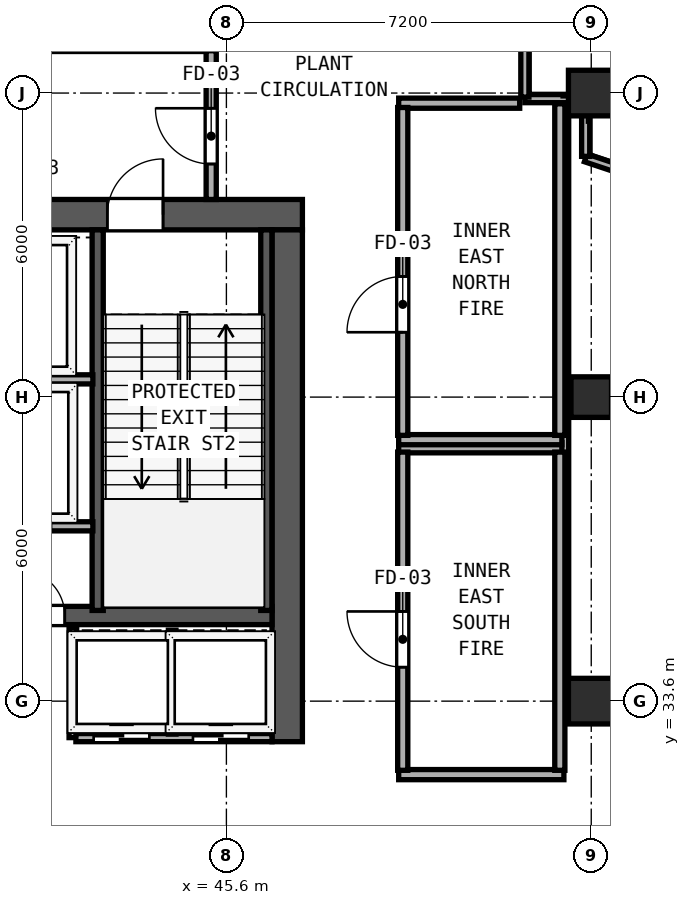
"""IFC4 building model, lengths in metres.
Left out: names, types, materials, properties, quantities, classifications, styles, units other than length and angle.
Written with IfcOpenShell. Run it as: python <this file> out.ifc"""

import sys

from ifc_helpers import new_model, si_unit, direction, frame, frame_2d, origin, origin_2d, place, context, subcontext, project, spatial, rectangle, hollow_rectangle, extrude, element, fill, save


model = new_model("IFC4")
c1 = context("Model", 3, precision=1e-05, world=origin(), true_north=direction((0.0, 1.0)))
c2 = subcontext(c1, "Body", "Model", "MODEL_VIEW")
j1 = project(units=[si_unit("LENGTHUNIT", "METRE"), si_unit("PLANEANGLEUNIT", "RADIAN")], contexts=[c1])
p1 = place(None, origin())
s1 = spatial("IfcSite", under=j1, at=p1, CompositionType="ELEMENT")
p2 = place(p1, origin())
s2 = spatial("IfcBuilding", under=s1, at=p2, CompositionType="ELEMENT")
p3 = place(p2, frame((0.0, 0.0, 230.6)))
s3 = spatial("IfcBuildingStorey", under=s2, at=p3, CompositionType="ELEMENT", Elevation=230.6)
p4 = place(p3, frame((29.7, 43.2, 0.0), z_axis=(0.0, 0.0, 1.0), x_axis=(1.0, 0.0, 0.0)))
e1 = element("IfcWall", 1, at=p4, inside=s3, PredefinedType="SHEAR", context=c2, shape_type="SweptSolid", body=[
    extrude(rectangle(XDim=17.4, YDim=0.6, at=frame_2d((8.7, 0.0))), origin(), (0.0, 0.0, 1.0), 4.35),
])
p5 = place(p4, frame((2.35, 0.0, 0.0)))
e2 = element("IfcOpeningElement", 2, at=p5, cuts=e1, PredefinedType="OPENING", context=c2, shape_type="SweptSolid", body=[
    extrude(rectangle(XDim=1.1, YDim=2.15, at=frame_2d((0.55, 1.075))), frame((0.0, 0.31, 0.0), z_axis=(0.0, -1.0, 0.0), x_axis=(1.0, 0.0, 0.0)), (0.0, 0.0, 1.0), 0.62),
])
p6 = place(p4, frame((7.46, 0.0, 0.0)))
e3 = element("IfcOpeningElement", 3, at=p6, cuts=e1, PredefinedType="OPENING", context=c2, shape_type="SweptSolid", body=[
    extrude(rectangle(XDim=1.1, YDim=2.15, at=frame_2d((0.55, 1.075))), frame((0.0, 0.31, 0.0), z_axis=(0.0, -1.0, 0.0), x_axis=(1.0, 0.0, 0.0)), (0.0, 0.0, 1.0), 0.62),
])
p7 = place(p4, frame((13.55, 0.0, 0.0)))
e4 = element("IfcOpeningElement", 4, at=p7, cuts=e1, PredefinedType="OPENING", context=c2, shape_type="SweptSolid", body=[
    extrude(rectangle(XDim=1.1, YDim=2.15, at=frame_2d((0.55, 1.075))), frame((0.0, 0.31, 0.0), z_axis=(0.0, -1.0, 0.0), x_axis=(1.0, 0.0, 0.0)), (0.0, 0.0, 1.0), 0.62),
])
p8 = place(p4, frame((4.68, 0.0, 0.0)))
e5 = element("IfcOpeningElement", 5, at=p8, cuts=e1, PredefinedType="OPENING", context=c2, shape_type="SweptSolid", body=[
    extrude(rectangle(XDim=1.1, YDim=2.2, at=frame_2d((0.55, 1.1))), frame((0.0, 0.31, 0.0), z_axis=(0.0, -1.0, 0.0), x_axis=(1.0, 0.0, 0.0)), (0.0, 0.0, 1.0), 0.62),
])
p9 = place(p4, frame((11.04, 0.0, 0.0)))
e6 = element("IfcOpeningElement", 6, at=p9, cuts=e1, PredefinedType="OPENING", context=c2, shape_type="SweptSolid", body=[
    extrude(rectangle(XDim=1.1, YDim=2.2, at=frame_2d((0.55, 1.1))), frame((0.0, 0.31, 0.0), z_axis=(0.0, -1.0, 0.0), x_axis=(1.0, 0.0, 0.0)), (0.0, 0.0, 1.0), 0.62),
])
p10 = place(p3, frame((46.8, 32.8, 0.0), z_axis=(0.0, 0.0, 1.0), x_axis=(0.0, 1.0, 0.0)))
e7 = element("IfcWall", 7, at=p10, inside=s3, PredefinedType="SHEAR", context=c2, shape_type="SweptSolid", body=[
    extrude(rectangle(XDim=10.1, YDim=0.6, at=frame_2d((5.05, 0.0))), origin(), (0.0, 0.0, 1.0), 4.35),
])
p11 = place(p3, frame((30.3, 35.29, 0.0), z_axis=(0.0, 0.0, 1.0), x_axis=(1.0, 0.0, 0.0)))
e8 = element("IfcWall", 8, at=p11, inside=s3, PredefinedType="SHEAR", context=c2, shape_type="SweptSolid", body=[
    extrude(rectangle(XDim=16.2, YDim=0.36, at=frame_2d((8.1, 0.0))), origin(), (0.0, 0.0, 1.0), 4.35),
])
p12 = place(p11, frame((5.05, 0.0, 0.0), z_axis=(0.0, 0.0, 1.0), x_axis=(-1.0, 0.0, 0.0)))
e9 = element("IfcOpeningElement", 9, at=p12, cuts=e8, PredefinedType="OPENING", context=c2, shape_type="SweptSolid", body=[
    extrude(rectangle(XDim=0.9, YDim=2.1, at=frame_2d((0.45, 1.05))), frame((0.0, 0.19, 0.0), z_axis=(0.0, -1.0, 0.0), x_axis=(1.0, 0.0, 0.0)), (0.0, 0.0, 1.0), 0.38),
])
p13 = place(p11, frame((12.11, 0.0, 0.0), z_axis=(0.0, 0.0, 1.0), x_axis=(-1.0, 0.0, 0.0)))
e10 = element("IfcOpeningElement", 10, at=p13, cuts=e8, PredefinedType="OPENING", context=c2, shape_type="SweptSolid", body=[
    extrude(rectangle(XDim=0.9, YDim=2.1, at=frame_2d((0.45, 1.05))), frame((0.0, 0.19, 0.0), z_axis=(0.0, -1.0, 0.0), x_axis=(1.0, 0.0, 0.0)), (0.0, 0.0, 1.0), 0.38),
])
for number, where, z_axis, x_axis in (
    (11, (43.06, 35.39, 0.0), (0.0, 0.0, 1.0), (0.0, 1.0, 0.0)),
    (12, (46.388, 35.39, 0.0), (0.0, 0.0, 1.0), (0.0, 1.0, 0.0)),
):
    element("IfcWall", number, at=place(p3, frame(where, z_axis=z_axis, x_axis=x_axis)), inside=s3, PredefinedType="SHEAR", context=c2, shape_type="SweptSolid", body=[
        extrude(rectangle(XDim=7.51, YDim=0.22, at=frame_2d((3.755, 0.0))), origin(), (0.0, 0.0, 1.0), 4.35),
    ])
for number, where, z_axis, x_axis in (
    (13, (52.8, 33.6, 0.0), (0.0, 0.0, 1.0), (1.0, 0.0, 0.0)),
    (14, (52.8, 45.6, 0.0), (0.0, 0.0, 1.0), (1.0, 0.0, 0.0)),
):
    element("IfcColumn", number, at=place(p3, frame(where, z_axis=z_axis, x_axis=x_axis)), inside=s3, PredefinedType="COLUMN", context=c2, shape_type="SweptSolid", body=[
        extrude(hollow_rectangle(XDim=0.9, YDim=0.9, WallThickness=0.034, at=origin_2d()), origin(), (0.0, 0.0, 1.0), 4.6),
    ])
p14 = place(p3, frame((52.8, 39.6, 0.0), z_axis=(0.0, 0.0, 1.0), x_axis=(1.0, 0.0, 0.0)))
e15 = element("IfcColumn", 15, at=p14, inside=s3, PredefinedType="COLUMN", context=c2, shape_type="SweptSolid", body=[
    extrude(hollow_rectangle(XDim=0.8, YDim=0.8, WallThickness=0.03, at=origin_2d()), origin(), (0.0, 0.0, 1.0), 4.6),
])
p15 = place(p3, frame((58.476, 42.392, 0.0), z_axis=(0.0, 0.0, 1.0), x_axis=(-0.948687300706, 0.316215757798, 0.0)))
e16 = element("IfcWall", 16, at=p15, inside=s3, PredefinedType="PARAPET", context=c2, shape_type="SweptSolid", body=[
    extrude(rectangle(XDim=6.099, YDim=0.16, at=frame_2d((3.05, 0.0))), origin(), (0.0, 0.0, 1.0), 1.15),
])
p16 = place(p3, frame((52.69, 44.351, 0.0), z_axis=(0.0, 0.0, 1.0), x_axis=(0.0, 1.0, 0.0)))
e17 = element("IfcWall", 17, at=p16, inside=s3, PredefinedType="PARAPET", context=c2, shape_type="SweptSolid", body=[
    extrude(rectangle(XDim=0.807, YDim=0.16, at=frame_2d((0.404, 0.0))), origin(), (0.0, 0.0, 1.0), 1.15),
])
p17 = place(p3, frame((52.358, 45.49, 0.0), z_axis=(0.0, 0.0, 1.0), x_axis=(-1.0, 0.0, 0.0)))
e18 = element("IfcWall", 18, at=p17, inside=s3, PredefinedType="PARAPET", context=c2, shape_type="SweptSolid", body=[
    extrude(rectangle(XDim=0.868, YDim=0.16, at=frame_2d((0.434, 0.0))), origin(), (0.0, 0.0, 1.0), 1.15),
])
p18 = place(p3, frame((51.49, 45.52, 0.0), z_axis=(0.0, 0.0, 1.0), x_axis=(0.0, 1.0, 0.0)))
e19 = element("IfcWall", 19, at=p18, inside=s3, PredefinedType="PARAPET", context=c2, shape_type="SweptSolid", body=[
    extrude(rectangle(XDim=1.17, YDim=0.16, at=frame_2d((0.585, 0.0))), origin(), (0.0, 0.0, 1.0), 1.15),
])
p19 = place(p3, frame((45.3, 43.5, 0.0), z_axis=(0.0, 0.0, 1.0), x_axis=(0.0, 1.0, 0.0)))
e20 = element("IfcWall", 20, at=p19, inside=s3, PredefinedType="SOLIDWALL", context=c2, shape_type="SweptSolid", body=[
    extrude(rectangle(XDim=2.935, YDim=0.2, at=frame_2d((1.468, 0.0))), origin(), (0.0, 0.0, 1.0), 4.35),
])
p20 = place(p19, frame((0.7, 0.0, 0.0)))
e21 = element("IfcOpeningElement", 21, at=p20, cuts=e20, PredefinedType="OPENING", context=c2, shape_type="SweptSolid", body=[
    extrude(rectangle(XDim=1.1, YDim=2.15, at=frame_2d((0.55, 1.075))), frame((0.0, 0.11, 0.0), z_axis=(0.0, -1.0, 0.0), x_axis=(1.0, 0.0, 0.0)), (0.0, 0.0, 1.0), 0.22),
])
p21 = place(p3, frame((40.195, 39.95, 0.0), z_axis=(0.0, 0.0, 1.0), x_axis=(1.0, 0.0, 0.0)))
e22 = element("IfcWall", 22, at=p21, inside=s3, PredefinedType="SOLIDWALL", context=c2, shape_type="SweptSolid", body=[
    extrude(rectangle(XDim=2.77, YDim=0.18, at=frame_2d((1.385, 0.0))), origin(), (0.0, 0.0, 1.0), 4.35),
])
p22 = place(p3, frame((40.195, 37.05, 0.0), z_axis=(0.0, 0.0, 1.0), x_axis=(1.0, 0.0, 0.0)))
e23 = element("IfcWall", 23, at=p22, inside=s3, PredefinedType="SOLIDWALL", context=c2, shape_type="SweptSolid", body=[
    extrude(rectangle(XDim=2.77, YDim=0.18, at=frame_2d((1.385, 0.0))), origin(), (0.0, 0.0, 1.0), 4.35),
])
p23 = place(p22, frame((1.945, 0.0, 0.0), z_axis=(0.0, 0.0, 1.0), x_axis=(-1.0, 0.0, 0.0)))
e24 = element("IfcOpeningElement", 24, at=p23, cuts=e23, PredefinedType="OPENING", context=c2, shape_type="SweptSolid", body=[
    extrude(rectangle(XDim=1.2, YDim=2.2, at=frame_2d((0.6, 1.1))), frame((0.0, 0.1, 0.0), z_axis=(0.0, -1.0, 0.0), x_axis=(1.0, 0.0, 0.0)), (0.0, 0.0, 1.0), 0.2),
])
p24 = place(p3, frame((42.57, 32.88, 0.0), z_axis=(0.0, 0.0, 1.0), x_axis=(0.0, 1.0, 0.0)))
e25 = element("IfcWall", 25, at=p24, inside=s3, PredefinedType="SOLIDWALL", context=c2, shape_type="SweptSolid", body=[
    extrude(rectangle(XDim=2.17, YDim=0.15, at=frame_2d((1.085, 0.0))), origin(), (0.0, 0.0, 1.0), 4.35),
])
p25 = place(p3, frame((42.63, 32.88, 0.0), z_axis=(0.0, 0.0, 1.0), x_axis=(1.0, 0.0, 0.0)))
e26 = element("IfcWall", 26, at=p25, inside=s3, PredefinedType="SOLIDWALL", context=c2, shape_type="SweptSolid", body=[
    extrude(rectangle(XDim=3.87, YDim=0.16, at=frame_2d((1.935, 0.0))), origin(), (0.0, 0.0, 1.0), 4.35),
])
p26 = place(p25, frame((1.45, 0.0, 0.0), z_axis=(0.0, 0.0, 1.0), x_axis=(-1.0, 0.0, 0.0)))
e27 = element("IfcOpeningElement", 27, at=p26, cuts=e26, PredefinedType="OPENING", context=c2, shape_type="SweptSolid", body=[
    extrude(rectangle(XDim=1.1, YDim=2.2, at=frame_2d((0.55, 1.1))), frame((0.0, 0.09, 0.0), z_axis=(0.0, -1.0, 0.0), x_axis=(1.0, 0.0, 0.0)), (0.0, 0.0, 1.0), 0.18),
])
p27 = place(p25, frame((3.41, 0.0, 0.0), z_axis=(0.0, 0.0, 1.0), x_axis=(-1.0, 0.0, 0.0)))
e28 = element("IfcOpeningElement", 28, at=p27, cuts=e26, PredefinedType="OPENING", context=c2, shape_type="SweptSolid", body=[
    extrude(rectangle(XDim=1.1, YDim=2.2, at=frame_2d((0.55, 1.1))), frame((0.0, 0.09, 0.0), z_axis=(0.0, -1.0, 0.0), x_axis=(1.0, 0.0, 0.0)), (0.0, 0.0, 1.0), 0.18),
])
p28 = place(p3, frame((44.53, 32.95, 0.0), z_axis=(0.0, 0.0, 1.0), x_axis=(0.0, 1.0, 0.0)))
e29 = element("IfcWall", 29, at=p28, inside=s3, PredefinedType="SOLIDWALL", context=c2, shape_type="SweptSolid", body=[
    extrude(rectangle(XDim=2.05, YDim=0.15, at=frame_2d((1.025, 0.0))), origin(), (0.0, 0.0, 1.0), 4.35),
])
p29 = place(p3, frame((52.28, 33.6, 0.0), z_axis=(0.0, 0.0, 1.0), x_axis=(0.0, 1.0, 0.0)))
e30 = element("IfcWall", 30, at=p29, inside=s3, PredefinedType="PARTITIONING", context=c2, shape_type="SweptSolid", body=[
    extrude(rectangle(XDim=11.788, YDim=0.15, at=frame_2d((5.894, 0.0))), origin(), (0.0, 0.0, 1.0), 4.35),
])
p30 = place(p3, frame((49.0, 38.6, 0.0), z_axis=(0.0, 0.0, 1.0), x_axis=(1.0, 0.0, 0.0)))
e31 = element("IfcWall", 31, at=p30, inside=s3, PredefinedType="SOLIDWALL", context=c2, shape_type="SweptSolid", body=[
    extrude(rectangle(XDim=3.22, YDim=0.2, at=frame_2d((1.61, 0.0))), origin(), (0.0, 0.0, 1.0), 4.35),
])
p31 = place(p3, frame((49.0, 32.15, 0.0), z_axis=(0.0, 0.0, 1.0), x_axis=(1.0, 0.0, 0.0)))
e32 = element("IfcWall", 32, at=p31, inside=s3, PredefinedType="SOLIDWALL", context=c2, shape_type="SweptSolid", body=[
    extrude(rectangle(XDim=3.26, YDim=0.2, at=frame_2d((1.63, 0.0))), origin(), (0.0, 0.0, 1.0), 4.35),
])
p32 = place(p3, frame((49.08, 32.235, 0.0), z_axis=(0.0, 0.0, 1.0), x_axis=(0.0, 1.0, 0.0)))
e33 = element("IfcWall", 33, at=p32, inside=s3, PredefinedType="SOLIDWALL", context=c2, shape_type="SweptSolid", body=[
    extrude(rectangle(XDim=6.28, YDim=0.2, at=frame_2d((3.14, 0.0))), origin(), (0.0, 0.0, 1.0), 4.35),
])
p33 = place(p32, frame((2.035, 0.0, 0.0)))
e34 = element("IfcOpeningElement", 34, at=p33, cuts=e33, PredefinedType="OPENING", context=c2, shape_type="SweptSolid", body=[
    extrude(rectangle(XDim=1.1, YDim=2.15, at=frame_2d((0.55, 1.075))), frame((0.0, 0.11, 0.0), z_axis=(0.0, -1.0, 0.0), x_axis=(1.0, 0.0, 0.0)), (0.0, 0.0, 1.0), 0.22),
])
p34 = place(p3, frame((52.18, 32.235, 0.0), z_axis=(0.0, 0.0, 1.0), x_axis=(0.0, 1.0, 0.0)))
e35 = element("IfcWall", 35, at=p34, inside=s3, PredefinedType="SOLIDWALL", context=c2, shape_type="SweptSolid", body=[
    extrude(rectangle(XDim=6.28, YDim=0.2, at=frame_2d((3.14, 0.0))), origin(), (0.0, 0.0, 1.0), 4.35),
])
p35 = place(p3, frame((49.0, 45.4, 0.0), z_axis=(0.0, 0.0, 1.0), x_axis=(1.0, 0.0, 0.0)))
e36 = element("IfcWall", 36, at=p35, inside=s3, PredefinedType="SOLIDWALL", context=c2, shape_type="SweptSolid", body=[
    extrude(rectangle(XDim=2.388, YDim=0.2, at=frame_2d((1.194, 0.0))), origin(), (0.0, 0.0, 1.0), 4.35),
])
p36 = place(p3, frame((49.0, 38.76, 0.0), z_axis=(0.0, 0.0, 1.0), x_axis=(1.0, 0.0, 0.0)))
e37 = element("IfcWall", 37, at=p36, inside=s3, PredefinedType="SOLIDWALL", context=c2, shape_type="SweptSolid", body=[
    extrude(rectangle(XDim=3.22, YDim=0.2, at=frame_2d((1.61, 0.0))), origin(), (0.0, 0.0, 1.0), 4.35),
])
p37 = place(p3, frame((49.08, 38.845, 0.0), z_axis=(0.0, 0.0, 1.0), x_axis=(0.0, 1.0, 0.0)))
e38 = element("IfcWall", 38, at=p37, inside=s3, PredefinedType="SOLIDWALL", context=c2, shape_type="SweptSolid", body=[
    extrude(rectangle(XDim=6.47, YDim=0.2, at=frame_2d((3.235, 0.0))), origin(), (0.0, 0.0, 1.0), 4.35),
])
p38 = place(p37, frame((2.035, 0.0, 0.0)))
e39 = element("IfcOpeningElement", 39, at=p38, cuts=e38, PredefinedType="OPENING", context=c2, shape_type="SweptSolid", body=[
    extrude(rectangle(XDim=1.1, YDim=2.15, at=frame_2d((0.55, 1.075))), frame((0.0, 0.11, 0.0), z_axis=(0.0, -1.0, 0.0), x_axis=(1.0, 0.0, 0.0)), (0.0, 0.0, 1.0), 0.22),
])
p39 = place(p3, frame((52.18, 38.845, 0.0), z_axis=(0.0, 0.0, 1.0), x_axis=(0.0, 1.0, 0.0)))
e40 = element("IfcWall", 40, at=p39, inside=s3, PredefinedType="SOLIDWALL", context=c2, shape_type="SweptSolid", body=[
    extrude(rectangle(XDim=6.543, YDim=0.2, at=frame_2d((3.271, 0.0))), origin(), (0.0, 0.0, 1.0), 4.35),
])
p40 = place(p7, origin())
e41 = element("IfcDoor", 41, at=p40, inside=s3, OperationType="SINGLE_SWING_RIGHT", PredefinedType="DOOR", context=c2, shape_type="SweptSolid", body=[
    extrude(rectangle(XDim=1.1, YDim=2.15, at=frame_2d((0.55, 1.075))), frame((0.0, 0.185, 0.0), z_axis=(0.0, -1.0, 0.0), x_axis=(1.0, 0.0, 0.0)), (0.0, 0.0, 1.0), 0.05),
])
fill(e4, e41)
p41 = place(p20, origin())
e42 = element("IfcDoor", 42, at=p41, inside=s3, OperationType="SINGLE_SWING_RIGHT", PredefinedType="DOOR", context=c2, shape_type="SweptSolid", body=[
    extrude(rectangle(XDim=1.1, YDim=2.15, at=frame_2d((0.55, 1.075))), frame((0.0, 0.025, 0.0), z_axis=(0.0, -1.0, 0.0), x_axis=(1.0, 0.0, 0.0)), (0.0, 0.0, 1.0), 0.05),
])
fill(e21, e42)
p42 = place(p13, origin())
e43 = element("IfcDoor", 43, at=p42, inside=s3, OperationType="SINGLE_SWING_RIGHT", PredefinedType="DOOR", context=c2, shape_type="SweptSolid", body=[
    extrude(rectangle(XDim=0.9, YDim=2.1, at=frame_2d((0.45, 1.05))), frame((0.0, 0.025, 0.0), z_axis=(0.0, -1.0, 0.0), x_axis=(1.0, 0.0, 0.0)), (0.0, 0.0, 1.0), 0.05),
])
fill(e10, e43)
p43 = place(p26, origin())
e44 = element("IfcDoor", 44, at=p43, inside=s3, OperationType="SLIDING_TO_RIGHT", PredefinedType="DOOR", context=c2, shape_type="SweptSolid", body=[
    extrude(rectangle(XDim=1.1, YDim=2.2, at=frame_2d((0.55, 1.1))), frame((0.0, 0.025, 0.0), z_axis=(0.0, -1.0, 0.0), x_axis=(1.0, 0.0, 0.0)), (0.0, 0.0, 1.0), 0.05),
])
fill(e27, e44)
p44 = place(p27, origin())
e45 = element("IfcDoor", 45, at=p44, inside=s3, OperationType="SLIDING_TO_RIGHT", PredefinedType="DOOR", context=c2, shape_type="SweptSolid", body=[
    extrude(rectangle(XDim=1.1, YDim=2.2, at=frame_2d((0.55, 1.1))), frame((0.0, 0.025, 0.0), z_axis=(0.0, -1.0, 0.0), x_axis=(1.0, 0.0, 0.0)), (0.0, 0.0, 1.0), 0.05),
])
fill(e28, e45)
p45 = place(p33, origin())
e46 = element("IfcDoor", 46, at=p45, inside=s3, OperationType="SINGLE_SWING_RIGHT", PredefinedType="DOOR", context=c2, shape_type="SweptSolid", body=[
    extrude(rectangle(XDim=1.1, YDim=2.15, at=frame_2d((0.55, 1.075))), frame((0.0, 0.025, 0.0), z_axis=(0.0, -1.0, 0.0), x_axis=(1.0, 0.0, 0.0)), (0.0, 0.0, 1.0), 0.05),
])
fill(e34, e46)
p46 = place(p38, origin())
e47 = element("IfcDoor", 47, at=p46, inside=s3, OperationType="SINGLE_SWING_LEFT", PredefinedType="DOOR", context=c2, shape_type="SweptSolid", body=[
    extrude(rectangle(XDim=1.1, YDim=2.15, at=frame_2d((0.55, 1.075))), frame((0.0, 0.025, 0.0), z_axis=(0.0, -1.0, 0.0), x_axis=(1.0, 0.0, 0.0)), (0.0, 0.0, 1.0), 0.05),
])
fill(e39, e47)
save(model, sys.argv[1])
